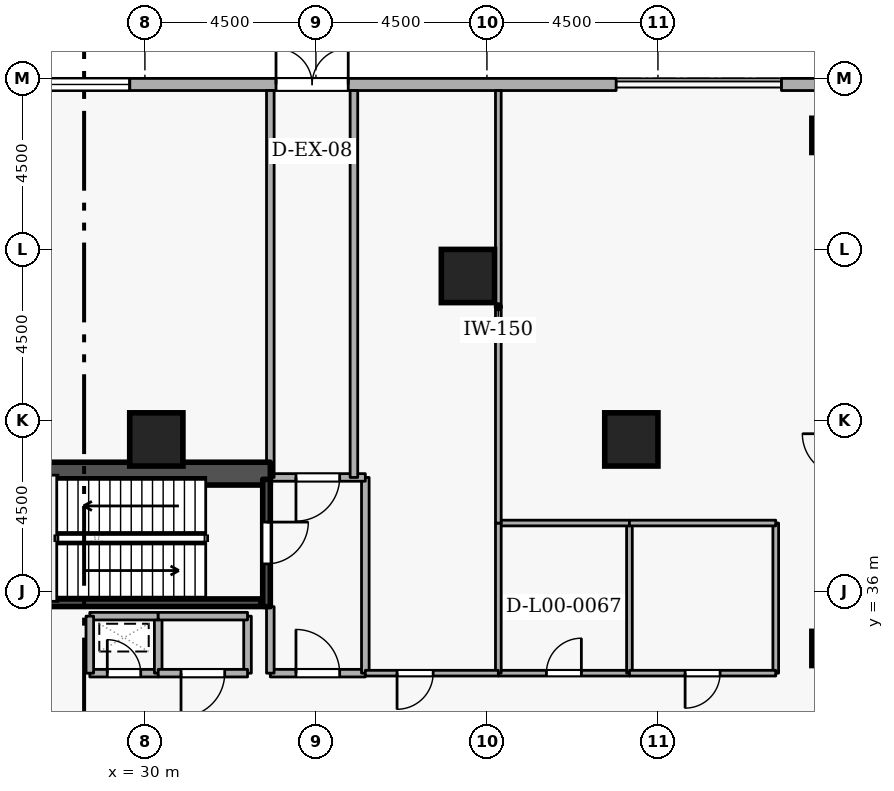
"""IFC4 building model, lengths in metres.
Left out: names, types, materials, properties, quantities, classifications, styles, units other than length and angle.
Written with IfcOpenShell. Run it as: python <this file> out.ifc"""

import sys

from ifc_helpers import new_model, si_unit, direction, frame, frame_2d, origin, origin_2d, place, context, subcontext, project, spatial, rectangle, extrude, element, fill, save


model = new_model("IFC4")
c1 = context("Model", 3, precision=1e-05, world=origin(), true_north=direction((0.0, 1.0)))
c2 = subcontext(c1, "Body", "Model", "MODEL_VIEW")
j1 = project(units=[si_unit("LENGTHUNIT", "METRE"), si_unit("PLANEANGLEUNIT", "RADIAN")], contexts=[c1])
p1 = place(None, origin())
s1 = spatial("IfcSite", under=j1, at=p1, CompositionType="ELEMENT")
p2 = place(p1, origin())
s2 = spatial("IfcBuilding", under=s1, at=p2, CompositionType="ELEMENT")
p3 = place(p2, origin())
s3 = spatial("IfcBuildingStorey", under=s2, at=p3, CompositionType="ELEMENT", Elevation=0.0)
p4 = place(p3, frame((17.7, 39.1, 0.0), z_axis=(0.0, 0.0, 1.0), x_axis=(1.0, 0.0, 0.0)))
e1 = element("IfcWall", 1, at=p4, inside=s3, PredefinedType="SHEAR", context=c2, shape_type="SweptSolid", body=[
    extrude(rectangle(XDim=15.6, YDim=0.6, at=frame_2d((7.8, 0.0))), origin(), (0.0, 0.0, 1.0), 4.8),
])
for number, where, z_axis, x_axis in (
    (2, (42.8, 40.0, 0.0), (0.0, 0.0, 1.0), (1.0, 0.0, 0.0)),
    (3, (38.5, 44.3, 0.0), (0.0, 0.0, 1.0), (1.0, 0.0, 0.0)),
    (4, (30.3, 40.0, 0.0), (0.0, 0.0, 1.0), (1.0, 0.0, 0.0)),
):
    element("IfcColumn", number, at=place(p3, frame(where, z_axis=z_axis, x_axis=x_axis)), inside=s3, PredefinedType="COLUMN", context=c2, shape_type="SweptSolid", body=[
        extrude(rectangle(XDim=1.4, YDim=1.4, at=origin_2d()), origin(), (0.0, 0.0, 1.0), 4.8),
    ])
for number, where, z_axis, x_axis in (
    (5, (48.0, 34.5, 0.0), (0.0, 0.0, 1.0), (1.0, 0.0, 0.0)),
    (6, (48.0, 48.0, 0.0), (0.0, 0.0, 1.0), (1.0, 0.0, 0.0)),
):
    element("IfcColumn", number, at=place(p3, frame(where, z_axis=z_axis, x_axis=x_axis)), inside=s3, PredefinedType="COLUMN", context=c2, shape_type="SweptSolid", body=[
        extrude(rectangle(XDim=0.9, YDim=0.9, at=origin_2d()), origin(), (0.0, 0.0, 1.0), 4.8),
    ])
p5 = place(p3, frame((49.25, 49.34, 0.0), z_axis=(0.0, 0.0, 1.0), x_axis=(-1.0, 0.0, 0.0)))
e7 = element("IfcWall", 7, at=p5, inside=s3, PredefinedType="STANDARD", context=c2, shape_type="SweptSolid", body=[
    extrude(rectangle(XDim=2.5, YDim=0.32, at=frame_2d((1.25, 0.0))), origin(), (0.0, 0.0, 1.0), 3.86),
])
p6 = place(p3, frame((42.4, 49.34, 0.0), z_axis=(0.0, 0.0, 1.0), x_axis=(-1.0, 0.0, 0.0)))
e8 = element("IfcWall", 8, at=p6, inside=s3, PredefinedType="STANDARD", context=c2, shape_type="SweptSolid", body=[
    extrude(rectangle(XDim=39.4, YDim=0.32, at=frame_2d((19.7, 0.0))), origin(), (0.0, 0.0, 1.0), 3.86),
])
p7 = place(p6, frame((8.95, 0.0, 0.0), z_axis=(0.0, 0.0, 1.0), x_axis=(-1.0, 0.0, 0.0)))
e9 = element("IfcOpeningElement", 9, at=p7, cuts=e8, PredefinedType="OPENING", context=c2, shape_type="SweptSolid", body=[
    extrude(rectangle(XDim=1.9, YDim=2.25, at=frame_2d((0.95, 1.125))), frame((0.0, 0.17, 0.0), z_axis=(0.0, -1.0, 0.0), x_axis=(1.0, 0.0, 0.0)), (0.0, 0.0, 1.0), 0.34),
])
p8 = place(p6, frame((12.8, 0.0, 0.78)))
e10 = element("IfcOpeningElement", 10, at=p8, cuts=e8, PredefinedType="OPENING", context=c2, shape_type="SweptSolid", body=[
    extrude(rectangle(XDim=2.1, YDim=2.4, at=frame_2d((1.05, 1.2))), frame((0.0, 0.17, 0.0), z_axis=(0.0, -1.0, 0.0), x_axis=(1.0, 0.0, 0.0)), (0.0, 0.0, 1.0), 0.34),
])
p9 = place(p6, frame((22.8, 0.0, 0.78)))
e11 = element("IfcOpeningElement", 11, at=p9, cuts=e8, PredefinedType="OPENING", context=c2, shape_type="SweptSolid", body=[
    extrude(rectangle(XDim=2.1, YDim=2.4, at=frame_2d((1.05, 1.2))), frame((0.0, 0.17, 0.0), z_axis=(0.0, -1.0, 0.0), x_axis=(1.0, 0.0, 0.0)), (0.0, 0.0, 1.0), 0.34),
])
p10 = place(p3, frame((33.2, 38.95, 0.0), z_axis=(0.0, 0.0, 1.0), x_axis=(0.0, -1.0, 0.0)))
e12 = element("IfcWall", 12, at=p10, inside=s3, PredefinedType="SHEAR", context=c2, shape_type="SweptSolid", body=[
    extrude(rectangle(XDim=3.35, YDim=0.2, at=frame_2d((1.675, 0.0))), origin(), (0.0, 0.0, 1.0), 4.8),
])
p11 = place(p10, frame((1.125, 0.0, 0.0)))
e13 = element("IfcOpeningElement", 13, at=p11, cuts=e12, PredefinedType="OPENING", context=c2, shape_type="SweptSolid", body=[
    extrude(rectangle(XDim=1.1, YDim=2.1, at=frame_2d((0.55, 1.05))), frame((0.0, 0.11, 0.0), z_axis=(0.0, -1.0, 0.0), x_axis=(1.0, 0.0, 0.0)), (0.0, 0.0, 1.0), 0.22),
])
p12 = place(p3, frame((25.95, 35.703, 0.0), z_axis=(0.0, 0.0, 1.0), x_axis=(1.0, 0.0, 0.0)))
e14 = element("IfcWall", 14, at=p12, inside=s3, PredefinedType="SHEAR", context=c2, shape_type="SweptSolid", body=[
    extrude(rectangle(XDim=7.1, YDim=0.2, at=frame_2d((3.55, 0.0))), origin(), (0.0, 0.0, 1.0), 4.8),
])
p13 = place(p3, frame((33.3, 33.85, 0.0), z_axis=(0.0, 0.0, 1.0), x_axis=(1.0, 0.0, 0.0)))
e15 = element("IfcWall", 15, at=p13, inside=s3, PredefinedType="STANDARD", context=c2, shape_type="SweptSolid", body=[
    extrude(rectangle(XDim=2.5, YDim=0.2, at=frame_2d((1.25, 0.0))), origin(), (0.0, 0.0, 1.0), 4.46),
])
p14 = place(p13, frame((0.675, 0.0, 0.0)))
e16 = element("IfcOpeningElement", 16, at=p14, cuts=e15, PredefinedType="OPENING", context=c2, shape_type="SweptSolid", body=[
    extrude(rectangle(XDim=1.15, YDim=2.1, at=frame_2d((0.575, 1.05))), frame((0.0, 0.11, 0.0), z_axis=(0.0, -1.0, 0.0), x_axis=(1.0, 0.0, 0.0)), (0.0, 0.0, 1.0), 0.22),
])
p15 = place(p3, frame((35.8, 33.85, 0.0), z_axis=(0.0, 0.0, 1.0), x_axis=(0.0, 1.0, 0.0)))
e17 = element("IfcWall", 17, at=p15, inside=s3, PredefinedType="STANDARD", context=c2, shape_type="SweptSolid", body=[
    extrude(rectangle(XDim=5.15, YDim=0.2, at=frame_2d((2.575, 0.0))), origin(), (0.0, 0.0, 1.0), 4.46),
])
p16 = place(p3, frame((35.8, 39.0, 0.0), z_axis=(0.0, 0.0, 1.0), x_axis=(-1.0, 0.0, 0.0)))
e18 = element("IfcWall", 18, at=p16, inside=s3, PredefinedType="STANDARD", context=c2, shape_type="SweptSolid", body=[
    extrude(rectangle(XDim=2.5, YDim=0.2, at=frame_2d((1.25, 0.0))), origin(), (0.0, 0.0, 1.0), 4.46),
])
p17 = place(p16, frame((0.675, 0.0, 0.0)))
e19 = element("IfcOpeningElement", 19, at=p17, cuts=e18, PredefinedType="OPENING", context=c2, shape_type="SweptSolid", body=[
    extrude(rectangle(XDim=1.15, YDim=2.1, at=frame_2d((0.575, 1.05))), frame((0.0, 0.11, 0.0), z_axis=(0.0, -1.0, 0.0), x_axis=(1.0, 0.0, 0.0)), (0.0, 0.0, 1.0), 0.22),
])
p18 = place(p3, frame((33.3, 35.6, 0.0), z_axis=(0.0, 0.0, 1.0), x_axis=(0.0, -1.0, 0.0)))
e20 = element("IfcWall", 20, at=p18, inside=s3, PredefinedType="STANDARD", context=c2, shape_type="SweptSolid", body=[
    extrude(rectangle(XDim=1.75, YDim=0.2, at=frame_2d((0.875, 0.0))), origin(), (0.0, 0.0, 1.0), 3.665),
])
p19 = place(p3, frame((28.55, 33.85, 0.0), z_axis=(0.0, 0.0, 1.0), x_axis=(1.0, 0.0, 0.0)))
e21 = element("IfcWall", 21, at=p19, inside=s3, PredefinedType="STANDARD", context=c2, shape_type="SweptSolid", body=[
    extrude(rectangle(XDim=1.8, YDim=0.2, at=frame_2d((0.9, 0.0))), origin(), (0.0, 0.0, 1.0), 4.46),
])
p20 = place(p19, frame((0.46, 0.0, 0.0)))
e22 = element("IfcOpeningElement", 22, at=p20, cuts=e21, PredefinedType="OPENING", context=c2, shape_type="SweptSolid", body=[
    extrude(rectangle(XDim=0.88, YDim=2.04, at=frame_2d((0.44, 1.02))), frame((0.0, 0.11, 0.0), z_axis=(0.0, -1.0, 0.0), x_axis=(1.0, 0.0, 0.0)), (0.0, 0.0, 1.0), 0.22),
])
p21 = place(p3, frame((30.35, 33.85, 0.0), z_axis=(0.0, 0.0, 1.0), x_axis=(0.0, 1.0, 0.0)))
e23 = element("IfcWall", 23, at=p21, inside=s3, PredefinedType="STANDARD", context=c2, shape_type="SweptSolid", body=[
    extrude(rectangle(XDim=1.5, YDim=0.2, at=frame_2d((0.75, 0.0))), origin(), (0.0, 0.0, 1.0), 4.46),
])
p22 = place(p3, frame((30.35, 35.35, 0.0), z_axis=(0.0, 0.0, 1.0), x_axis=(-1.0, 0.0, 0.0)))
e24 = element("IfcWall", 24, at=p22, inside=s3, PredefinedType="STANDARD", context=c2, shape_type="SweptSolid", body=[
    extrude(rectangle(XDim=1.8, YDim=0.2, at=frame_2d((0.9, 0.0))), origin(), (0.0, 0.0, 1.0), 4.46),
])
p23 = place(p3, frame((28.55, 35.35, 0.0), z_axis=(0.0, 0.0, 1.0), x_axis=(0.0, -1.0, 0.0)))
e25 = element("IfcWall", 25, at=p23, inside=s3, PredefinedType="STANDARD", context=c2, shape_type="SweptSolid", body=[
    extrude(rectangle(XDim=1.5, YDim=0.2, at=frame_2d((0.75, 0.0))), origin(), (0.0, 0.0, 1.0), 4.46),
])
p24 = place(p3, frame((32.7, 35.35, 0.0), z_axis=(0.0, 0.0, 1.0), x_axis=(0.0, -1.0, 0.0)))
e26 = element("IfcWall", 26, at=p24, inside=s3, PredefinedType="STANDARD", context=c2, shape_type="SweptSolid", body=[
    extrude(rectangle(XDim=1.5, YDim=0.2, at=frame_2d((0.75, 0.0))), origin(), (0.0, 0.0, 1.0), 3.665),
])
p25 = place(p3, frame((32.7, 33.85, 0.0), z_axis=(0.0, 0.0, 1.0), x_axis=(-1.0, 0.0, 0.0)))
e27 = element("IfcWall", 27, at=p25, inside=s3, PredefinedType="STANDARD", context=c2, shape_type="SweptSolid", body=[
    extrude(rectangle(XDim=2.35, YDim=0.2, at=frame_2d((1.175, 0.0))), origin(), (0.0, 0.0, 1.0), 4.46),
])
p26 = place(p25, frame((0.6, 0.0, 0.0)))
e28 = element("IfcOpeningElement", 28, at=p26, cuts=e27, PredefinedType="OPENING", context=c2, shape_type="SweptSolid", body=[
    extrude(rectangle(XDim=1.15, YDim=2.1, at=frame_2d((0.575, 1.05))), frame((0.0, 0.11, 0.0), z_axis=(0.0, -1.0, 0.0), x_axis=(1.0, 0.0, 0.0)), (0.0, 0.0, 1.0), 0.22),
])
p27 = place(p3, frame((30.35, 35.35, 0.0), z_axis=(0.0, 0.0, 1.0), x_axis=(1.0, 0.0, 0.0)))
e29 = element("IfcWall", 29, at=p27, inside=s3, PredefinedType="STANDARD", context=c2, shape_type="SweptSolid", body=[
    extrude(rectangle(XDim=2.35, YDim=0.2, at=frame_2d((1.175, 0.0))), origin(), (0.0, 0.0, 1.0), 4.46),
])
p28 = place(p3, frame((33.3, 39.0, 0.0), z_axis=(0.0, 0.0, 1.0), x_axis=(0.0, 1.0, 0.0)))
e30 = element("IfcWall", 30, at=p28, inside=s3, PredefinedType="STANDARD", context=c2, shape_type="SweptSolid", body=[
    extrude(rectangle(XDim=10.18, YDim=0.2, at=frame_2d((5.09, 0.0))), origin(), (0.0, 0.0, 1.0), 3.665),
])
p29 = place(p3, frame((35.5, 49.18, 0.0), z_axis=(0.0, 0.0, 1.0), x_axis=(0.0, -1.0, 0.0)))
e31 = element("IfcWall", 31, at=p29, inside=s3, PredefinedType="STANDARD", context=c2, shape_type="SweptSolid", body=[
    extrude(rectangle(XDim=10.18, YDim=0.2, at=frame_2d((5.09, 0.0))), origin(), (0.0, 0.0, 1.0), 4.46),
])
p30 = place(p3, frame((39.3, 33.85, 0.0), z_axis=(0.0, 0.0, 1.0), x_axis=(1.0, 0.0, 0.0)))
e32 = element("IfcWall", 32, at=p30, inside=s3, PredefinedType="PARTITIONING", context=c2, shape_type="SweptSolid", body=[
    extrude(rectangle(XDim=3.45, YDim=0.15, at=frame_2d((1.725, 0.0))), origin(), (0.0, 0.0, 1.0), 4.46),
])
p31 = place(p30, frame((1.265, 0.0, 0.0)))
e33 = element("IfcOpeningElement", 33, at=p31, cuts=e32, PredefinedType="OPENING", context=c2, shape_type="SweptSolid", body=[
    extrude(rectangle(XDim=0.92, YDim=2.08, at=frame_2d((0.46, 1.04))), frame((0.0, 0.085, 0.0), z_axis=(0.0, -1.0, 0.0), x_axis=(1.0, 0.0, 0.0)), (0.0, 0.0, 1.0), 0.17),
])
p32 = place(p3, frame((42.75, 33.85, 0.0), z_axis=(0.0, 0.0, 1.0), x_axis=(0.0, 1.0, 0.0)))
e34 = element("IfcWall", 34, at=p32, inside=s3, PredefinedType="PARTITIONING", context=c2, shape_type="SweptSolid", body=[
    extrude(rectangle(XDim=3.95, YDim=0.15, at=frame_2d((1.975, 0.0))), origin(), (0.0, 0.0, 1.0), 3.538),
])
p33 = place(p3, frame((42.75, 37.8, 0.0), z_axis=(0.0, 0.0, 1.0), x_axis=(-1.0, 0.0, 0.0)))
e35 = element("IfcWall", 35, at=p33, inside=s3, PredefinedType="PARTITIONING", context=c2, shape_type="SweptSolid", body=[
    extrude(rectangle(XDim=3.45, YDim=0.15, at=frame_2d((1.725, 0.0))), origin(), (0.0, 0.0, 1.0), 4.46),
])
for number, where, z_axis, x_axis in (
    (36, (39.3, 37.8, 0.0), (0.0, 0.0, 1.0), (0.0, -1.0, 0.0)),
    (37, (46.6, 37.8, 0.0), (0.0, 0.0, 1.0), (0.0, -1.0, 0.0)),
):
    element("IfcWall", number, at=place(p3, frame(where, z_axis=z_axis, x_axis=x_axis)), inside=s3, PredefinedType="PARTITIONING", context=c2, shape_type="SweptSolid", body=[
        extrude(rectangle(XDim=3.95, YDim=0.15, at=frame_2d((1.975, 0.0))), origin(), (0.0, 0.0, 1.0), 4.46),
    ])
p34 = place(p3, frame((46.6, 33.85, 0.0), z_axis=(0.0, 0.0, 1.0), x_axis=(-1.0, 0.0, 0.0)))
e38 = element("IfcWall", 38, at=p34, inside=s3, PredefinedType="PARTITIONING", context=c2, shape_type="SweptSolid", body=[
    extrude(rectangle(XDim=3.85, YDim=0.15, at=frame_2d((1.925, 0.0))), origin(), (0.0, 0.0, 1.0), 4.46),
])
p35 = place(p34, frame((1.465, 0.0, 0.0)))
e39 = element("IfcOpeningElement", 39, at=p35, cuts=e38, PredefinedType="OPENING", context=c2, shape_type="SweptSolid", body=[
    extrude(rectangle(XDim=0.92, YDim=2.08, at=frame_2d((0.46, 1.04))), frame((0.0, 0.085, 0.0), z_axis=(0.0, -1.0, 0.0), x_axis=(1.0, 0.0, 0.0)), (0.0, 0.0, 1.0), 0.17),
])
p36 = place(p3, frame((42.75, 37.8, 0.0), z_axis=(0.0, 0.0, 1.0), x_axis=(1.0, 0.0, 0.0)))
e40 = element("IfcWall", 40, at=p36, inside=s3, PredefinedType="PARTITIONING", context=c2, shape_type="SweptSolid", body=[
    extrude(rectangle(XDim=3.85, YDim=0.15, at=frame_2d((1.925, 0.0))), origin(), (0.0, 0.0, 1.0), 4.46),
])
p37 = place(p3, frame((39.3, 49.18, 0.0), z_axis=(0.0, 0.0, 1.0), x_axis=(0.0, -1.0, 0.0)))
e41 = element("IfcWall", 41, at=p37, inside=s3, PredefinedType="PARTITIONING", context=c2, shape_type="SweptSolid", body=[
    extrude(rectangle(XDim=11.38, YDim=0.15, at=frame_2d((5.69, 0.0))), origin(), (0.0, 0.0, 1.0), 4.46),
])
p38 = place(p3, frame((39.3, 33.85, 0.0), z_axis=(0.0, 0.0, 1.0), x_axis=(-1.0, 0.0, 0.0)))
e42 = element("IfcWall", 42, at=p38, inside=s3, PredefinedType="PARTITIONING", context=c2, shape_type="SweptSolid", body=[
    extrude(rectangle(XDim=3.5, YDim=0.15, at=frame_2d((1.75, 0.0))), origin(), (0.0, 0.0, 1.0), 4.46),
])
p39 = place(p38, frame((1.715, 0.0, 0.0)))
e43 = element("IfcOpeningElement", 43, at=p39, cuts=e42, PredefinedType="OPENING", context=c2, shape_type="SweptSolid", body=[
    extrude(rectangle(XDim=0.95, YDim=2.1, at=frame_2d((0.475, 1.05))), frame((0.0, 0.085, 0.0), z_axis=(0.0, -1.0, 0.0), x_axis=(1.0, 0.0, 0.0)), (0.0, 0.0, 1.0), 0.17),
])
p40 = place(p7, origin())
e44 = element("IfcDoor", 44, at=p40, inside=s3, OperationType="DOUBLE_DOOR_SINGLE_SWING", PredefinedType="DOOR", context=c2, shape_type="SweptSolid", body=[
    extrude(rectangle(XDim=1.9, YDim=2.25, at=frame_2d((0.95, 1.125))), frame((0.0, 0.025, 0.0), z_axis=(0.0, -1.0, 0.0), x_axis=(1.0, 0.0, 0.0)), (0.0, 0.0, 1.0), 0.05),
])
fill(e9, e44)
p41 = place(p8, origin())
e45 = element("IfcWindow", 45, at=p41, inside=s3, PartitioningType="SINGLE_PANEL", PredefinedType="WINDOW", context=c2, shape_type="SweptSolid", body=[
    extrude(rectangle(XDim=2.1, YDim=2.4, at=frame_2d((1.05, 1.2))), frame((0.0, 0.03, 0.0), z_axis=(0.0, -1.0, 0.0), x_axis=(1.0, 0.0, 0.0)), (0.0, 0.0, 1.0), 0.06),
])
fill(e10, e45)
p42 = place(p11, origin())
e46 = element("IfcDoor", 46, at=p42, inside=s3, OperationType="SINGLE_SWING_LEFT", PredefinedType="DOOR", context=c2, shape_type="SweptSolid", body=[
    extrude(rectangle(XDim=1.1, YDim=2.1, at=frame_2d((0.55, 1.05))), frame((0.0, 0.025, 0.0), z_axis=(0.0, -1.0, 0.0), x_axis=(1.0, 0.0, 0.0)), (0.0, 0.0, 1.0), 0.05),
])
fill(e13, e46)
p43 = place(p14, origin())
e47 = element("IfcDoor", 47, at=p43, inside=s3, OperationType="SINGLE_SWING_LEFT", PredefinedType="DOOR", context=c2, shape_type="SweptSolid", body=[
    extrude(rectangle(XDim=1.15, YDim=2.1, at=frame_2d((0.575, 1.05))), frame((0.0, 0.025, 0.0), z_axis=(0.0, -1.0, 0.0), x_axis=(1.0, 0.0, 0.0)), (0.0, 0.0, 1.0), 0.05),
])
fill(e16, e47)
p44 = place(p20, origin())
e48 = element("IfcDoor", 48, at=p44, inside=s3, OperationType="SINGLE_SWING_LEFT", PredefinedType="DOOR", context=c2, shape_type="SweptSolid", body=[
    extrude(rectangle(XDim=0.88, YDim=2.04, at=frame_2d((0.44, 1.02))), frame((0.0, 0.025, 0.0), z_axis=(0.0, -1.0, 0.0), x_axis=(1.0, 0.0, 0.0)), (0.0, 0.0, 1.0), 0.05),
])
fill(e22, e48)
p45 = place(p26, origin())
e49 = element("IfcDoor", 49, at=p45, inside=s3, OperationType="SINGLE_SWING_RIGHT", PredefinedType="DOOR", context=c2, shape_type="SweptSolid", body=[
    extrude(rectangle(XDim=1.15, YDim=2.1, at=frame_2d((0.575, 1.05))), frame((0.0, 0.025, 0.0), z_axis=(0.0, -1.0, 0.0), x_axis=(1.0, 0.0, 0.0)), (0.0, 0.0, 1.0), 0.05),
])
fill(e28, e49)
p46 = place(p31, origin())
e50 = element("IfcDoor", 50, at=p46, inside=s3, OperationType="SINGLE_SWING_RIGHT", PredefinedType="DOOR", context=c2, shape_type="SweptSolid", body=[
    extrude(rectangle(XDim=0.92, YDim=2.08, at=frame_2d((0.46, 1.04))), frame((0.0, 0.025, 0.0), z_axis=(0.0, -1.0, 0.0), x_axis=(1.0, 0.0, 0.0)), (0.0, 0.0, 1.0), 0.05),
])
fill(e33, e50)
p47 = place(p35, origin())
e51 = element("IfcDoor", 51, at=p47, inside=s3, OperationType="SINGLE_SWING_RIGHT", PredefinedType="DOOR", context=c2, shape_type="SweptSolid", body=[
    extrude(rectangle(XDim=0.92, YDim=2.08, at=frame_2d((0.46, 1.04))), frame((0.0, 0.025, 0.0), z_axis=(0.0, -1.0, 0.0), x_axis=(1.0, 0.0, 0.0)), (0.0, 0.0, 1.0), 0.05),
])
fill(e39, e51)
p48 = place(p17, origin())
e52 = element("IfcDoor", 52, at=p48, inside=s3, OperationType="SINGLE_SWING_RIGHT", PredefinedType="DOOR", context=c2, shape_type="SweptSolid", body=[
    extrude(rectangle(XDim=1.15, YDim=2.1, at=frame_2d((0.575, 1.05))), frame((0.0, 0.025, 0.0), z_axis=(0.0, -1.0, 0.0), x_axis=(1.0, 0.0, 0.0)), (0.0, 0.0, 1.0), 0.05),
])
fill(e19, e52)
p49 = place(p39, origin())
e53 = element("IfcDoor", 53, at=p49, inside=s3, OperationType="SINGLE_SWING_RIGHT", PredefinedType="DOOR", context=c2, shape_type="SweptSolid", body=[
    extrude(rectangle(XDim=0.95, YDim=2.1, at=frame_2d((0.475, 1.05))), frame((0.0, 0.025, 0.0), z_axis=(0.0, -1.0, 0.0), x_axis=(1.0, 0.0, 0.0)), (0.0, 0.0, 1.0), 0.05),
])
fill(e43, e53)
save(model, sys.argv[1])
